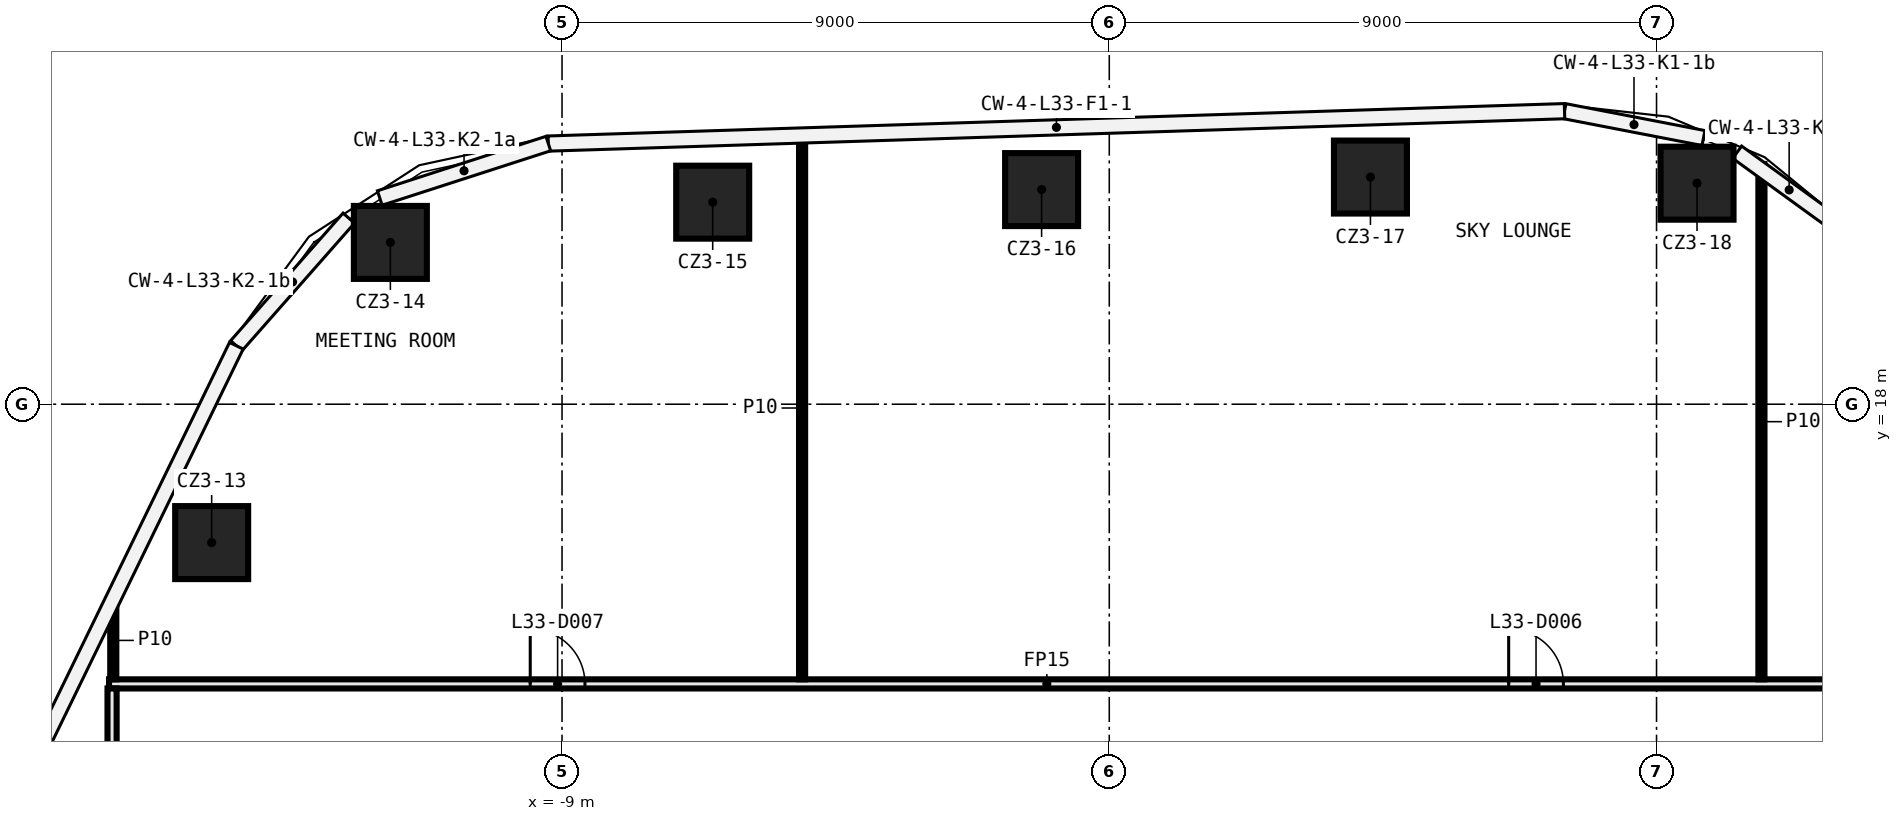
"""IFC4 building model, lengths in metres.
Left out: names, types, materials, properties, quantities, classifications, styles, units other than length and angle.
Written with IfcOpenShell. Run it as: python <this file> out.ifc"""

import sys

from ifc_helpers import new_model, si_unit, direction, frame, frame_2d, origin, origin_2d, place, context, subcontext, project, spatial, rectangle, extrude, element, fill, save


model = new_model("IFC4")
c1 = context("Model", 3, precision=1e-05, world=origin(), true_north=direction((0.0, 1.0)))
c2 = subcontext(c1, "Body", "Model", "MODEL_VIEW")
j1 = project(units=[si_unit("LENGTHUNIT", "METRE"), si_unit("PLANEANGLEUNIT", "RADIAN")], contexts=[c1])
p1 = place(None, origin())
s1 = spatial("IfcSite", under=j1, at=p1, CompositionType="ELEMENT")
p2 = place(p1, origin())
s2 = spatial("IfcBuilding", under=s1, at=p2, CompositionType="ELEMENT")
p3 = place(p2, frame((0.0, 0.0, 151.6)))
s3 = spatial("IfcBuildingStorey", under=s2, at=p3, CompositionType="ELEMENT", Elevation=151.6)
for number, where, z_axis, x_axis in (
    (1, (-14.762, 15.724, 0.0), (0.0, 0.0, 1.0), (1.0, 0.0, 0.0)),
    (2, (-11.823, 20.661, 0.0), (0.0, 0.0, 1.0), (1.0, 0.0, 0.0)),
    (3, (-6.522, 21.323, 0.0), (0.0, 0.0, 1.0), (1.0, 0.0, 0.0)),
    (4, (-1.113, 21.53, 0.0), (0.0, 0.0, 1.0), (1.0, 0.0, 0.0)),
    (5, (4.295, 21.736, 0.0), (0.0, 0.0, 1.0), (1.0, 0.0, 0.0)),
    (6, (9.666, 21.635, 0.0), (0.0, 0.0, 1.0), (1.0, 0.0, 0.0)),
):
    element("IfcColumn", number, at=place(p3, frame(where, z_axis=z_axis, x_axis=x_axis)), inside=s3, PredefinedType="COLUMN", context=c2, shape_type="SweptSolid", body=[
        extrude(rectangle(XDim=1.2, YDim=1.2, at=origin_2d()), origin(), (0.0, 0.0, 1.0), 6.62),
    ])
p4 = place(p3, frame((-16.45, 13.4, 0.0), z_axis=(0.0, 0.0, 1.0), x_axis=(1.0, 0.0, 0.0)))
e7 = element("IfcWall", 7, at=p4, inside=s3, PredefinedType="PARTITIONING", context=c2, shape_type="SweptSolid", body=[
    extrude(rectangle(XDim=32.925, YDim=0.15, at=frame_2d((16.462, 0.0))), origin(), (0.0, 0.0, 1.0), 6.62),
])
p5 = place(p4, frame((23.018, 0.0, 0.0)))
e8 = element("IfcOpeningElement", 8, at=p5, cuts=e7, PredefinedType="OPENING", context=c2, shape_type="SweptSolid", body=[
    extrude(rectangle(XDim=0.9, YDim=2.1, at=frame_2d((0.45, 1.05))), frame((0.0, 0.085, 0.0), z_axis=(0.0, -1.0, 0.0), x_axis=(1.0, 0.0, 0.0)), (0.0, 0.0, 1.0), 0.17),
])
p6 = place(p4, frame((6.927, 0.0, 0.0)))
e9 = element("IfcOpeningElement", 9, at=p6, cuts=e7, PredefinedType="OPENING", context=c2, shape_type="SweptSolid", body=[
    extrude(rectangle(XDim=0.9, YDim=2.1, at=frame_2d((0.45, 1.05))), frame((0.0, 0.085, 0.0), z_axis=(0.0, -1.0, 0.0), x_axis=(1.0, 0.0, 0.0)), (0.0, 0.0, 1.0), 0.17),
])
p7 = place(p3, frame((10.725, 13.475, 0.0), z_axis=(0.0, 0.0, 1.0), x_axis=(0.0, 1.0, 0.0)))
e10 = element("IfcWall", 10, at=p7, inside=s3, PredefinedType="PARTITIONING", context=c2, shape_type="SweptSolid", body=[
    extrude(rectangle(XDim=8.476, YDim=0.1, at=frame_2d((4.238, 0.0))), origin(), (0.0, 0.0, 1.0), 6.62),
])
p8 = place(p3, frame((-5.052, 13.475, 0.0), z_axis=(0.0, 0.0, 1.0), x_axis=(0.0, 1.0, 0.0)))
e11 = element("IfcWall", 11, at=p8, inside=s3, PredefinedType="PARTITIONING", context=c2, shape_type="SweptSolid", body=[
    extrude(rectangle(XDim=8.925, YDim=0.1, at=frame_2d((4.462, 0.0))), origin(), (0.0, 0.0, 1.0), 6.62),
])
p9 = place(p3, frame((-16.38, 13.475, 0.0), z_axis=(0.0, 0.0, 1.0), x_axis=(0.0, 1.0, 0.0)))
e12 = element("IfcWall", 12, at=p9, inside=s3, PredefinedType="PARTITIONING", context=c2, shape_type="SweptSolid", body=[
    extrude(rectangle(XDim=1.281, YDim=0.1, at=frame_2d((0.64, 0.0))), origin(), (0.0, 0.0, 1.0), 6.62),
])
p10 = place(p3, frame((-16.4, -13.325, 0.0), z_axis=(0.0, 0.0, 1.0), x_axis=(0.0, 1.0, 0.0)))
e13 = element("IfcWall", 13, at=p10, inside=s3, PredefinedType="PARTITIONING", context=c2, shape_type="SweptSolid", body=[
    extrude(rectangle(XDim=26.65, YDim=0.15, at=frame_2d((13.325, 0.0))), origin(), (0.0, 0.0, 1.0), 6.62),
])
p11 = place(p10, frame((4.993, 0.0, 0.0)))
e14 = element("IfcOpeningElement", 14, at=p11, cuts=e13, PredefinedType="OPENING", context=c2, shape_type="SweptSolid", body=[
    extrude(rectangle(XDim=0.9, YDim=2.1, at=frame_2d((0.45, 1.05))), frame((0.0, 0.085, 0.0), z_axis=(0.0, -1.0, 0.0), x_axis=(1.0, 0.0, 0.0)), (0.0, 0.0, 1.0), 0.17),
])
p12 = place(p10, frame((10.403, 0.0, 0.0)))
e15 = element("IfcOpeningElement", 15, at=p12, cuts=e13, PredefinedType="OPENING", context=c2, shape_type="SweptSolid", body=[
    extrude(rectangle(XDim=0.9, YDim=2.1, at=frame_2d((0.45, 1.05))), frame((0.0, 0.085, 0.0), z_axis=(0.0, -1.0, 0.0), x_axis=(1.0, 0.0, 0.0)), (0.0, 0.0, 1.0), 0.17),
])
p13 = place(p5, origin())
e16 = element("IfcDoor", 16, at=p13, inside=s3, OperationType="SINGLE_SWING_LEFT", PredefinedType="DOOR", context=c2, shape_type="SweptSolid", body=[
    extrude(rectangle(XDim=0.9, YDim=2.1, at=frame_2d((0.45, 1.05))), frame((0.0, 0.025, 0.0), z_axis=(0.0, -1.0, 0.0), x_axis=(1.0, 0.0, 0.0)), (0.0, 0.0, 1.0), 0.05),
])
fill(e8, e16)
p14 = place(p6, origin())
e17 = element("IfcDoor", 17, at=p14, inside=s3, OperationType="SINGLE_SWING_RIGHT", PredefinedType="DOOR", context=c2, shape_type="SweptSolid", body=[
    extrude(rectangle(XDim=0.9, YDim=2.1, at=frame_2d((0.45, 1.05))), frame((0.0, 0.025, 0.0), z_axis=(0.0, -1.0, 0.0), x_axis=(1.0, 0.0, 0.0)), (0.0, 0.0, 1.0), 0.05),
])
fill(e9, e17)
save(model, sys.argv[1])
